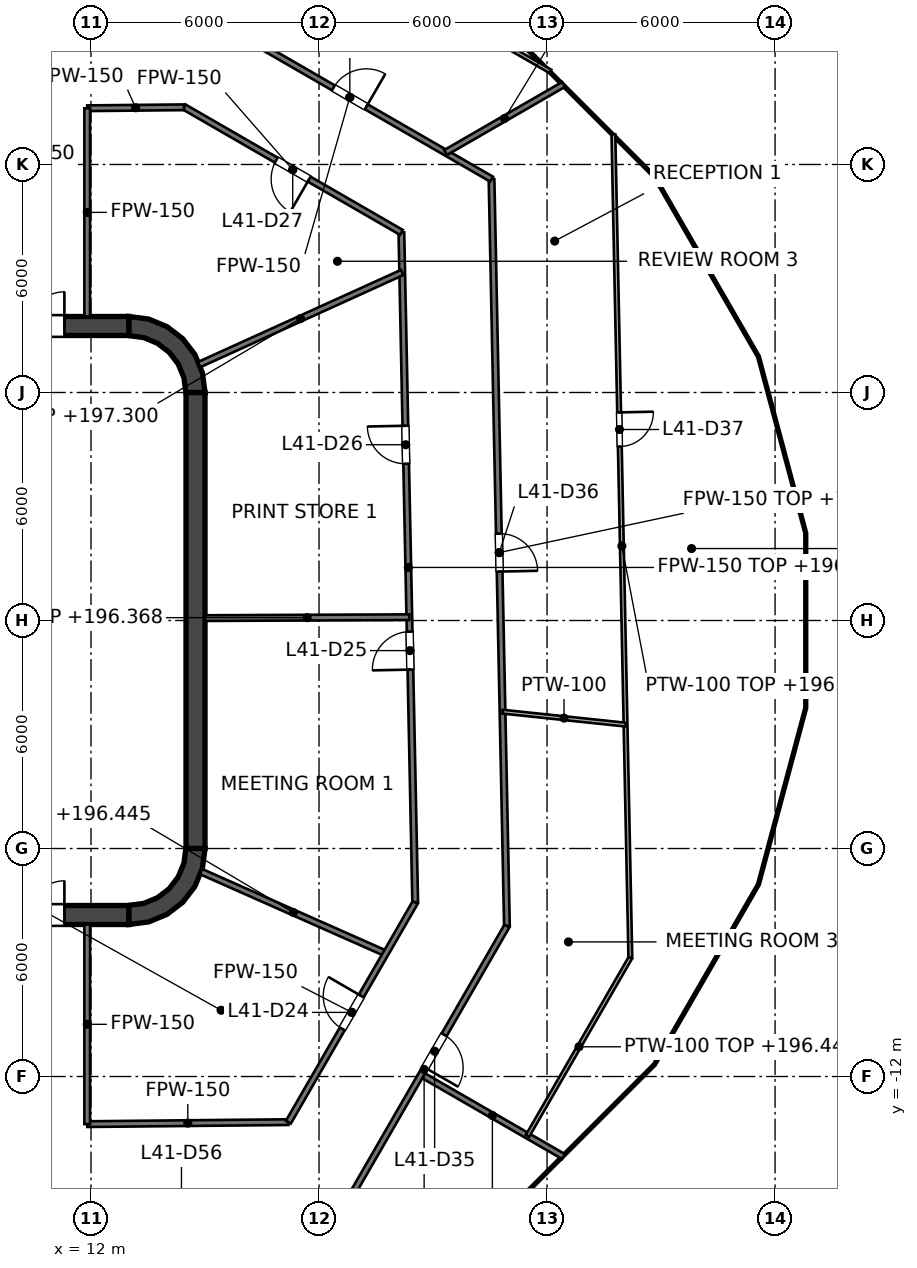
"""IFC4 building model, lengths in metres.
Left out: names, types, materials, properties, quantities, classifications, styles, units other than length and angle.
Written with IfcOpenShell. Run it as: python <this file> out.ifc"""

import sys

from ifc_helpers import new_model, si_unit, direction, frame, frame_2d, origin, place, context, subcontext, project, spatial, polyline, rectangle, outline, extrude, element, fill, save


model = new_model("IFC4")
c1 = context("Model", 3, precision=1e-05, world=origin(), true_north=direction((0.0, 1.0)))
c2 = subcontext(c1, "Body", "Model", "MODEL_VIEW")
j1 = project(units=[si_unit("LENGTHUNIT", "METRE"), si_unit("PLANEANGLEUNIT", "RADIAN")], contexts=[c1])
p1 = place(None, origin())
s1 = spatial("IfcSite", under=j1, at=p1, CompositionType="ELEMENT")
p2 = place(p1, origin())
s2 = spatial("IfcBuilding", under=s1, at=p2, CompositionType="ELEMENT")
p3 = place(p2, frame((0.0, 0.0, 193.6)))
s3 = spatial("IfcBuildingStorey", under=s2, at=p3, CompositionType="ELEMENT", Elevation=193.6)
p4 = place(p3, frame((-13.0, 7.75, 0.0), z_axis=(0.0, 0.0, 1.0), x_axis=(1.0, 0.0, 0.0)))
e1 = element("IfcWall", 1, at=p4, inside=s3, PredefinedType="SHEAR", context=c2, shape_type="SweptSolid", body=[
    extrude(rectangle(XDim=26.0, YDim=0.5, at=frame_2d((13.0, 0.0))), origin(), (0.0, 0.0, 1.0), 4.0),
])
p5 = place(p4, frame((1.7, 0.0, 0.0)))
e2 = element("IfcOpeningElement", 2, at=p5, cuts=e1, PredefinedType="OPENING", context=c2, shape_type="SweptSolid", body=[
    extrude(rectangle(XDim=1.8, YDim=2.1, at=frame_2d((0.9, 1.05))), frame((0.0, 0.25, 0.0), z_axis=(0.0, -1.0, 0.0), x_axis=(1.0, 0.0, 0.0)), (0.0, 0.0, 1.0), 0.5),
])
p6 = place(p4, frame((22.5, 0.0, 0.0)))
e3 = element("IfcOpeningElement", 3, at=p6, cuts=e1, PredefinedType="OPENING", context=c2, shape_type="SweptSolid", body=[
    extrude(rectangle(XDim=1.8, YDim=2.1, at=frame_2d((0.9, 1.05))), frame((0.0, 0.25, 0.0), z_axis=(0.0, -1.0, 0.0), x_axis=(1.0, 0.0, 0.0)), (0.0, 0.0, 1.0), 0.5),
])
p7 = place(p3, frame((-13.0, -7.75, 0.0), z_axis=(0.0, 0.0, 1.0), x_axis=(1.0, 0.0, 0.0)))
e4 = element("IfcWall", 4, at=p7, inside=s3, PredefinedType="SHEAR", context=c2, shape_type="SweptSolid", body=[
    extrude(rectangle(XDim=26.0, YDim=0.5, at=frame_2d((13.0, 0.0))), origin(), (0.0, 0.0, 1.0), 4.0),
])
p8 = place(p7, frame((1.7, 0.0, 0.0)))
e5 = element("IfcOpeningElement", 5, at=p8, cuts=e4, PredefinedType="OPENING", context=c2, shape_type="SweptSolid", body=[
    extrude(rectangle(XDim=1.8, YDim=2.1, at=frame_2d((0.9, 1.05))), frame((0.0, 0.25, 0.0), z_axis=(0.0, -1.0, 0.0), x_axis=(1.0, 0.0, 0.0)), (0.0, 0.0, 1.0), 0.5),
])
p9 = place(p7, frame((22.5, 0.0, 0.0)))
e6 = element("IfcOpeningElement", 6, at=p9, cuts=e4, PredefinedType="OPENING", context=c2, shape_type="SweptSolid", body=[
    extrude(rectangle(XDim=1.8, YDim=2.1, at=frame_2d((0.9, 1.05))), frame((0.0, 0.25, 0.0), z_axis=(0.0, -1.0, 0.0), x_axis=(1.0, 0.0, 0.0)), (0.0, 0.0, 1.0), 0.5),
])
p10 = place(p3, frame((14.75, -6.0, 0.0), z_axis=(0.0, 0.0, 1.0), x_axis=(0.0, 1.0, 0.0)))
e7 = element("IfcWall", 7, at=p10, inside=s3, PredefinedType="SHEAR", context=c2, shape_type="SweptSolid", body=[
    extrude(rectangle(XDim=12.0, YDim=0.5, at=frame_2d((6.0, 0.0))), origin(), (0.0, 0.0, 1.0), 4.0),
])
p11 = place(p3, origin())
e8 = element("IfcWall", 8, at=p11, inside=s3, PredefinedType="SHEAR", context=c2, shape_type="SweptSolid", body=[
    extrude(outline(polyline([(13.0, 8.0), (13.0, 7.496), (13.387, 7.445), (13.748, 7.295), (14.058, 7.058), (14.295, 6.748), (14.445, 6.387), (14.496, 6.0), (15.0, 6.0), (14.932, 6.518), (14.732, 7.0), (14.414, 7.414), (14.0, 7.732), (13.518, 7.932), (13.0, 8.0)])), origin(), (0.0, 0.0, 1.0), 4.0),
])
e9 = element("IfcWall", 9, at=p11, inside=s3, PredefinedType="SHEAR", context=c2, shape_type="SweptSolid", body=[
    extrude(outline(polyline([(15.0, -6.0), (14.496, -6.0), (14.445, -6.387), (14.295, -6.748), (14.058, -7.058), (13.748, -7.295), (13.387, -7.445), (13.0, -7.496), (13.0, -8.0), (13.518, -7.932), (14.0, -7.732), (14.414, -7.414), (14.732, -7.0), (14.932, -6.518), (15.0, -6.0)])), origin(), (0.0, 0.0, 1.0), 4.0),
])
p12 = place(p3, frame((11.8, -7.5, 0.0), z_axis=(0.0, 0.0, 1.0), x_axis=(0.0, 1.0, 0.0)))
e10 = element("IfcWall", 10, at=p12, inside=s3, PredefinedType="SOLIDWALL", context=c2, shape_type="SweptSolid", body=[
    extrude(rectangle(XDim=15.0, YDim=0.4, at=frame_2d((7.5, 0.0))), origin(), (0.0, 0.0, 1.0), 3.7),
])
p13 = place(p12, frame((11.3, 0.0, 0.0)))
e11 = element("IfcOpeningElement", 11, at=p13, cuts=e10, PredefinedType="OPENING", context=c2, shape_type="SweptSolid", body=[
    extrude(rectangle(XDim=1.1, YDim=2.1, at=frame_2d((0.55, 1.05))), frame((0.0, 0.2, 0.0), z_axis=(0.0, -1.0, 0.0), x_axis=(1.0, 0.0, 0.0)), (0.0, 0.0, 1.0), 0.4),
])
p14 = place(p12, frame((8.4, 0.0, 0.0)))
e12 = element("IfcOpeningElement", 12, at=p14, cuts=e10, PredefinedType="OPENING", context=c2, shape_type="SweptSolid", body=[
    extrude(rectangle(XDim=1.1, YDim=2.1, at=frame_2d((0.55, 1.05))), frame((0.0, 0.2, 0.0), z_axis=(0.0, -1.0, 0.0), x_axis=(1.0, 0.0, 0.0)), (0.0, 0.0, 1.0), 0.4),
])
p15 = place(p12, frame((5.5, 0.0, 0.0)))
e13 = element("IfcOpeningElement", 13, at=p15, cuts=e10, PredefinedType="OPENING", context=c2, shape_type="SweptSolid", body=[
    extrude(rectangle(XDim=1.1, YDim=2.1, at=frame_2d((0.55, 1.05))), frame((0.0, 0.2, 0.0), z_axis=(0.0, -1.0, 0.0), x_axis=(1.0, 0.0, 0.0)), (0.0, 0.0, 1.0), 0.4),
])
p16 = place(p12, frame((13.697, 0.0, 0.0)))
e14 = element("IfcOpeningElement", 14, at=p16, cuts=e10, PredefinedType="OPENING", context=c2, shape_type="SweptSolid", body=[
    extrude(rectangle(XDim=0.9, YDim=2.1, at=frame_2d((0.45, 1.05))), frame((0.0, 0.2, 0.0), z_axis=(0.0, -1.0, 0.0), x_axis=(1.0, 0.0, 0.0)), (0.0, 0.0, 1.0), 0.4),
])
p17 = place(p12, frame((0.403, 0.0, 0.0)))
e15 = element("IfcOpeningElement", 15, at=p17, cuts=e10, PredefinedType="OPENING", context=c2, shape_type="SweptSolid", body=[
    extrude(rectangle(XDim=0.9, YDim=2.1, at=frame_2d((0.45, 1.05))), frame((0.0, 0.2, 0.0), z_axis=(0.0, -1.0, 0.0), x_axis=(1.0, 0.0, 0.0)), (0.0, 0.0, 1.0), 0.4),
])
e16 = element("IfcWall", 16, at=p11, inside=s3, PredefinedType="SOLIDWALL", context=c2, shape_type="SweptSolid", body=[
    extrude(outline(polyline([(12.0, -5.675), (12.0, -5.925), (14.25, -5.925), (14.5, -5.925), (14.5, -5.675), (14.5, -3.025), (14.5, -2.775), (14.5, -0.125), (14.5, 0.125), (14.5, 2.775), (14.5, 3.025), (14.5, 5.675), (14.5, 5.925), (14.25, 5.925), (12.0, 5.925), (12.0, 5.675), (14.25, 5.675), (14.25, 3.025), (12.0, 3.025), (12.0, 2.775), (14.25, 2.775), (14.25, 0.125), (12.0, 0.125), (12.0, -0.125), (14.25, -0.125), (14.25, -2.775), (12.0, -2.775), (12.0, -3.025), (14.25, -3.025), (14.25, -5.675), (12.0, -5.675)])), origin(), (0.0, 0.0, 1.0), 3.7),
])
p18 = place(p3, frame((20.167, 10.213, 0.0), z_axis=(0.0, 0.0, 1.0), x_axis=(0.020624730832, -0.999787287616, 0.0)))
e17 = element("IfcWall", 17, at=p18, inside=s3, PredefinedType="PARTITIONING", context=c2, shape_type="SweptSolid", body=[
    extrude(rectangle(XDim=17.637, YDim=0.15, at=frame_2d((8.819, 0.0))), origin(), (0.0, 0.0, 1.0), 2.768),
])
p19 = place(p18, frame((10.508, 0.0, 0.0)))
e18 = element("IfcOpeningElement", 18, at=p19, cuts=e17, PredefinedType="OPENING", context=c2, shape_type="SweptSolid", body=[
    extrude(rectangle(XDim=1.0, YDim=2.1, at=frame_2d((0.5, 1.05))), frame((0.0, 0.075, 0.0), z_axis=(0.0, -1.0, 0.0), x_axis=(1.0, 0.0, 0.0)), (0.0, 0.0, 1.0), 0.15),
])
p20 = place(p18, frame((5.089, 0.0, 0.0)))
e19 = element("IfcOpeningElement", 19, at=p20, cuts=e17, PredefinedType="OPENING", context=c2, shape_type="SweptSolid", body=[
    extrude(rectangle(XDim=1.0, YDim=2.1, at=frame_2d((0.5, 1.05))), frame((0.0, 0.075, 0.0), z_axis=(0.0, -1.0, 0.0), x_axis=(1.0, 0.0, 0.0)), (0.0, 0.0, 1.0), 0.15),
])
p21 = place(p3, frame((22.539, 11.615, 0.0), z_axis=(0.0, 0.0, 1.0), x_axis=(0.020626332176, -0.99978725458, 0.0)))
e20 = element("IfcWall", 20, at=p21, inside=s3, PredefinedType="PARTITIONING", context=c2, shape_type="SweptSolid", body=[
    extrude(rectangle(XDim=19.66, YDim=0.15, at=frame_2d((9.83, 0.0))), origin(), (0.0, 0.0, 1.0), 2.768),
])
p22 = place(p21, frame((9.33, 0.0, 0.0)))
e21 = element("IfcOpeningElement", 21, at=p22, cuts=e20, PredefinedType="OPENING", context=c2, shape_type="SweptSolid", body=[
    extrude(rectangle(XDim=1.0, YDim=2.1, at=frame_2d((0.5, 1.05))), frame((0.0, 0.075, 0.0), z_axis=(0.0, -1.0, 0.0), x_axis=(1.0, 0.0, 0.0)), (0.0, 0.0, 1.0), 0.15),
])
p23 = place(p3, frame((20.69, -11.945, 0.0), z_axis=(0.0, 0.0, 1.0), x_axis=(0.866048255864, -0.499960416948, 0.0)))
e22 = element("IfcWall", 22, at=p23, inside=s3, PredefinedType="PARTITIONING", context=c2, shape_type="SweptSolid", body=[
    extrude(rectangle(XDim=4.322, YDim=0.15, at=frame_2d((2.161, 0.0))), origin(), (0.0, 0.0, 1.0), 2.845),
])
p24 = place(p3, frame((14.448, 13.515, 0.0), z_axis=(0.0, 0.0, 1.0), x_axis=(0.866032288321, -0.499988075443, 0.0)))
e23 = element("IfcWall", 23, at=p24, inside=s3, PredefinedType="PARTITIONING", context=c2, shape_type="SweptSolid", body=[
    extrude(rectangle(XDim=6.604, YDim=0.15, at=frame_2d((3.302, 0.0))), origin(), (0.0, 0.0, 1.0), 2.777),
])
p25 = place(p24, frame((2.802, 0.0, 0.0)))
e24 = element("IfcOpeningElement", 24, at=p25, cuts=e23, PredefinedType="OPENING", context=c2, shape_type="SweptSolid", body=[
    extrude(rectangle(XDim=1.0, YDim=2.1, at=frame_2d((0.5, 1.05))), frame((0.0, 0.075, 0.0), z_axis=(0.0, -1.0, 0.0), x_axis=(1.0, 0.0, 0.0)), (0.0, 0.0, 1.0), 0.15),
])
p26 = place(p3, frame((15.08, 15.921, 0.0), z_axis=(0.0, 0.0, 1.0), x_axis=(0.866020838546, -0.500007907142, 0.0)))
e25 = element("IfcWall", 25, at=p26, inside=s3, PredefinedType="PARTITIONING", context=c2, shape_type="SweptSolid", body=[
    extrude(rectangle(XDim=8.613, YDim=0.15, at=frame_2d((4.306, 0.0))), origin(), (0.0, 0.0, 1.0), 2.777),
])
p27 = place(p26, frame((3.808, 0.0, 0.0)))
e26 = element("IfcOpeningElement", 26, at=p27, cuts=e25, PredefinedType="OPENING", context=c2, shape_type="SweptSolid", body=[
    extrude(rectangle(XDim=1.0, YDim=2.1, at=frame_2d((0.5, 1.05))), frame((0.0, 0.075, 0.0), z_axis=(0.0, -1.0, 0.0), x_axis=(1.0, 0.0, 0.0)), (0.0, 0.0, 1.0), 0.15),
])
p28 = place(p3, frame((14.895, -6.607, 0.0), z_axis=(0.0, 0.0, 1.0), x_axis=(0.914233271379, -0.405188259337, 0.0)))
e27 = element("IfcWall", 27, at=p28, inside=s3, PredefinedType="PARTITIONING", context=c2, shape_type="SweptSolid", body=[
    extrude(rectangle(XDim=5.317, YDim=0.15, at=frame_2d((2.659, 0.0))), origin(), (0.0, 0.0, 1.0), 2.845),
])
p29 = place(p3, frame((15.0, 0.063, 0.0), z_axis=(0.0, 0.0, 1.0), x_axis=(0.999990294223, 0.004405843865, 0.0)))
e28 = element("IfcWall", 28, at=p29, inside=s3, PredefinedType="PARTITIONING", context=c2, shape_type="SweptSolid", body=[
    extrude(rectangle(XDim=5.375, YDim=0.15, at=frame_2d((2.688, 0.0))), origin(), (0.0, 0.0, 1.0), 2.768),
])
p30 = place(p3, frame((11.9, -13.253, 0.0), z_axis=(0.0, 0.0, 1.0), x_axis=(0.999951309192, 0.009868092237, 0.0)))
e29 = element("IfcWall", 29, at=p30, inside=s3, PredefinedType="PARTITIONING", context=c2, shape_type="SweptSolid", body=[
    extrude(rectangle(XDim=5.294, YDim=0.15, at=frame_2d((2.647, 0.0))), origin(), (0.0, 0.0, 1.0), 2.777),
])
p31 = place(p3, frame((11.9, 13.48, 0.0), z_axis=(0.0, 0.0, 1.0), x_axis=(0.999951307579, 0.009868255694, 0.0)))
e30 = element("IfcWall", 30, at=p31, inside=s3, PredefinedType="PARTITIONING", context=c2, shape_type="SweptSolid", body=[
    extrude(rectangle(XDim=2.548, YDim=0.15, at=frame_2d((1.274, 0.0))), origin(), (0.0, 0.0, 1.0), 2.777),
])
p32 = place(p3, frame((14.843, 6.733, 0.0), z_axis=(0.0, 0.0, 1.0), x_axis=(0.910628361306, 0.413226315214, 0.0)))
e31 = element("IfcWall", 31, at=p32, inside=s3, PredefinedType="PARTITIONING", context=c2, shape_type="SweptSolid", body=[
    extrude(rectangle(XDim=5.87, YDim=0.15, at=frame_2d((2.935, 0.0))), origin(), (0.0, 0.0, 1.0), 3.7),
])
p33 = place(p3, frame((21.329, 12.314, 0.0), z_axis=(0.0, 0.0, 1.0), x_axis=(0.866038125567, 0.499977964579, 0.0)))
e32 = element("IfcWall", 32, at=p33, inside=s3, PredefinedType="PARTITIONING", context=c2, shape_type="SweptSolid", body=[
    extrude(rectangle(XDim=3.584, YDim=0.15, at=frame_2d((1.792, 0.0))), origin(), (0.0, 0.0, 1.0), 2.845),
])
p34 = place(p3, frame((18.587, -15.587, 0.0), z_axis=(0.0, 0.0, 1.0), x_axis=(0.499960140076, 0.866048415699, 0.0)))
e33 = element("IfcWall", 33, at=p34, inside=s3, PredefinedType="PARTITIONING", context=c2, shape_type="SweptSolid", body=[
    extrude(rectangle(XDim=8.714, YDim=0.15, at=frame_2d((4.357, 0.0))), origin(), (0.0, 0.0, 1.0), 2.777),
])
p35 = place(p34, frame((4.41, 0.0, 0.0)))
e34 = element("IfcOpeningElement", 34, at=p35, cuts=e33, PredefinedType="OPENING", context=c2, shape_type="SweptSolid", body=[
    extrude(rectangle(XDim=1.0, YDim=2.1, at=frame_2d((0.5, 1.05))), frame((0.0, 0.075, 0.0), z_axis=(0.0, -1.0, 0.0), x_axis=(1.0, 0.0, 0.0)), (0.0, 0.0, 1.0), 0.15),
])
p36 = place(p3, frame((17.194, -13.201, 0.0), z_axis=(0.0, 0.0, 1.0), x_axis=(0.499955744085, 0.866050953441, 0.0)))
e35 = element("IfcWall", 35, at=p36, inside=s3, PredefinedType="PARTITIONING", context=c2, shape_type="SweptSolid", body=[
    extrude(rectangle(XDim=6.673, YDim=0.15, at=frame_2d((3.337, 0.0))), origin(), (0.0, 0.0, 1.0), 2.777),
])
p37 = place(p36, frame((2.835, 0.0, 0.0)))
e36 = element("IfcOpeningElement", 36, at=p37, cuts=e35, PredefinedType="OPENING", context=c2, shape_type="SweptSolid", body=[
    extrude(rectangle(XDim=1.0, YDim=2.1, at=frame_2d((0.5, 1.05))), frame((0.0, 0.075, 0.0), z_axis=(0.0, -1.0, 0.0), x_axis=(1.0, 0.0, 0.0)), (0.0, 0.0, 1.0), 0.15),
])
p38 = place(p3, frame((11.9, -13.253, 0.0), z_axis=(0.0, 0.0, 1.0), x_axis=(0.0, 1.0, 0.0)))
e37 = element("IfcWall", 37, at=p38, inside=s3, PredefinedType="PARTITIONING", context=c2, shape_type="SweptSolid", body=[
    extrude(rectangle(XDim=5.253, YDim=0.15, at=frame_2d((2.626, 0.0))), origin(), (0.0, 0.0, 1.0), 2.777),
])
p39 = place(p3, frame((11.9, 8.0, 0.0), z_axis=(0.0, 0.0, 1.0), x_axis=(0.0, 1.0, 0.0)))
e38 = element("IfcWall", 38, at=p39, inside=s3, PredefinedType="PARTITIONING", context=c2, shape_type="SweptSolid", body=[
    extrude(rectangle(XDim=5.479, YDim=0.15, at=frame_2d((2.74, 0.0))), origin(), (0.0, 0.0, 1.0), 2.777),
])
p40 = place(p3, frame((25.746, 12.794, 0.0), z_axis=(0.0, 0.0, 1.0), x_axis=(0.020556718749, -0.999788688331, 0.0)))
e39 = element("IfcWall", 39, at=p40, inside=s3, PredefinedType="PARTITIONING", context=c2, shape_type="SweptSolid", body=[
    extrude(rectangle(XDim=21.675, YDim=0.1, at=frame_2d((10.837, 0.0))), origin(), (0.0, 0.0, 1.0), 2.768),
])
p41 = place(p40, frame((7.32, 0.0, 0.0)))
e40 = element("IfcOpeningElement", 40, at=p41, cuts=e39, PredefinedType="OPENING", context=c2, shape_type="SweptSolid", body=[
    extrude(rectangle(XDim=0.9, YDim=2.1, at=frame_2d((0.45, 1.05))), frame((0.0, 0.05, 0.0), z_axis=(0.0, -1.0, 0.0), x_axis=(1.0, 0.0, 0.0)), (0.0, 0.0, 1.0), 0.1),
])
p42 = place(p3, frame((15.931, 19.16, 0.0), z_axis=(0.0, 0.0, 1.0), x_axis=(0.86598056092, -0.500077662076, 0.0)))
e41 = element("IfcWall", 41, at=p42, inside=s3, PredefinedType="PARTITIONING", context=c2, shape_type="SweptSolid", body=[
    extrude(rectangle(XDim=9.42, YDim=0.1, at=frame_2d((4.71, 0.0))), origin(), (0.0, 0.0, 1.0), 2.777),
])
p43 = place(p3, frame((22.828, -2.399, 0.0), z_axis=(0.0, 0.0, 1.0), x_axis=(0.994498465997, -0.104751139033, 0.0)))
e42 = element("IfcWall", 42, at=p43, inside=s3, PredefinedType="PARTITIONING", context=c2, shape_type="SweptSolid", body=[
    extrude(rectangle(XDim=3.256, YDim=0.1, at=frame_2d((1.628, 0.0))), origin(), (0.0, 0.0, 1.0), 3.7),
])
p44 = place(p3, frame((23.487, -13.56, 0.0), z_axis=(0.0, 0.0, 1.0), x_axis=(0.500066272392, 0.86598713802, 0.0)))
e43 = element("IfcWall", 43, at=p44, inside=s3, PredefinedType="PARTITIONING", context=c2, shape_type="SweptSolid", body=[
    extrude(rectangle(XDim=5.409, YDim=0.1, at=frame_2d((2.705, 0.0))), origin(), (0.0, 0.0, 1.0), 2.845),
])
p45 = place(p13, origin())
e44 = element("IfcDoor", 44, at=p45, inside=s3, OperationType="DOUBLE_DOOR_SLIDING", PredefinedType="DOOR", context=c2, shape_type="SweptSolid", body=[
    extrude(rectangle(XDim=1.1, YDim=2.1, at=frame_2d((0.55, 1.05))), frame((0.0, 0.025, 0.0), z_axis=(0.0, -1.0, 0.0), x_axis=(1.0, 0.0, 0.0)), (0.0, 0.0, 1.0), 0.05),
])
fill(e11, e44)
p46 = place(p14, origin())
e45 = element("IfcDoor", 45, at=p46, inside=s3, OperationType="DOUBLE_DOOR_SLIDING", PredefinedType="DOOR", context=c2, shape_type="SweptSolid", body=[
    extrude(rectangle(XDim=1.1, YDim=2.1, at=frame_2d((0.55, 1.05))), frame((0.0, 0.025, 0.0), z_axis=(0.0, -1.0, 0.0), x_axis=(1.0, 0.0, 0.0)), (0.0, 0.0, 1.0), 0.05),
])
fill(e12, e45)
p47 = place(p15, origin())
e46 = element("IfcDoor", 46, at=p47, inside=s3, OperationType="DOUBLE_DOOR_SLIDING", PredefinedType="DOOR", context=c2, shape_type="SweptSolid", body=[
    extrude(rectangle(XDim=1.1, YDim=2.1, at=frame_2d((0.55, 1.05))), frame((0.0, 0.025, 0.0), z_axis=(0.0, -1.0, 0.0), x_axis=(1.0, 0.0, 0.0)), (0.0, 0.0, 1.0), 0.05),
])
fill(e13, e46)
p48 = place(p16, origin())
e47 = element("IfcDoor", 47, at=p48, inside=s3, OperationType="SINGLE_SWING_RIGHT", PredefinedType="DOOR", context=c2, shape_type="SweptSolid", body=[
    extrude(rectangle(XDim=0.9, YDim=2.1, at=frame_2d((0.45, 1.05))), frame((0.0, 0.025, 0.0), z_axis=(0.0, -1.0, 0.0), x_axis=(1.0, 0.0, 0.0)), (0.0, 0.0, 1.0), 0.05),
])
fill(e14, e47)
p49 = place(p17, origin())
e48 = element("IfcDoor", 48, at=p49, inside=s3, OperationType="SINGLE_SWING_RIGHT", PredefinedType="DOOR", context=c2, shape_type="SweptSolid", body=[
    extrude(rectangle(XDim=0.9, YDim=2.1, at=frame_2d((0.45, 1.05))), frame((0.0, 0.025, 0.0), z_axis=(0.0, -1.0, 0.0), x_axis=(1.0, 0.0, 0.0)), (0.0, 0.0, 1.0), 0.05),
])
fill(e15, e48)
p50 = place(p6, origin())
e49 = element("IfcDoor", 49, at=p50, inside=s3, OperationType="DOUBLE_DOOR_SINGLE_SWING", PredefinedType="DOOR", context=c2, shape_type="SweptSolid", body=[
    extrude(rectangle(XDim=1.8, YDim=2.1, at=frame_2d((0.9, 1.05))), frame((0.0, 0.025, 0.0), z_axis=(0.0, -1.0, 0.0), x_axis=(1.0, 0.0, 0.0)), (0.0, 0.0, 1.0), 0.05),
])
fill(e3, e49)
p51 = place(p9, origin())
e50 = element("IfcDoor", 50, at=p51, inside=s3, OperationType="DOUBLE_DOOR_SINGLE_SWING", PredefinedType="DOOR", context=c2, shape_type="SweptSolid", body=[
    extrude(rectangle(XDim=1.8, YDim=2.1, at=frame_2d((0.9, 1.05))), frame((0.0, 0.025, 0.0), z_axis=(0.0, -1.0, 0.0), x_axis=(1.0, 0.0, 0.0)), (0.0, 0.0, 1.0), 0.05),
])
fill(e6, e50)
p52 = place(p37, origin())
e51 = element("IfcDoor", 51, at=p52, inside=s3, OperationType="SINGLE_SWING_RIGHT", PredefinedType="DOOR", context=c2, shape_type="SweptSolid", body=[
    extrude(rectangle(XDim=1.0, YDim=2.1, at=frame_2d((0.5, 1.05))), frame((0.0, 0.025, 0.0), z_axis=(0.0, -1.0, 0.0), x_axis=(1.0, 0.0, 0.0)), (0.0, 0.0, 1.0), 0.05),
])
fill(e36, e51)
p53 = place(p19, origin())
e52 = element("IfcDoor", 52, at=p53, inside=s3, OperationType="SINGLE_SWING_RIGHT", PredefinedType="DOOR", context=c2, shape_type="SweptSolid", body=[
    extrude(rectangle(XDim=1.0, YDim=2.1, at=frame_2d((0.5, 1.05))), frame((0.0, 0.025, 0.0), z_axis=(0.0, -1.0, 0.0), x_axis=(1.0, 0.0, 0.0)), (0.0, 0.0, 1.0), 0.05),
])
fill(e18, e52)
p54 = place(p20, origin())
e53 = element("IfcDoor", 53, at=p54, inside=s3, OperationType="SINGLE_SWING_LEFT", PredefinedType="DOOR", context=c2, shape_type="SweptSolid", body=[
    extrude(rectangle(XDim=1.0, YDim=2.1, at=frame_2d((0.5, 1.05))), frame((0.0, 0.025, 0.0), z_axis=(0.0, -1.0, 0.0), x_axis=(1.0, 0.0, 0.0)), (0.0, 0.0, 1.0), 0.05),
])
fill(e19, e53)
p55 = place(p25, origin())
e54 = element("IfcDoor", 54, at=p55, inside=s3, OperationType="SINGLE_SWING_RIGHT", PredefinedType="DOOR", context=c2, shape_type="SweptSolid", body=[
    extrude(rectangle(XDim=1.0, YDim=2.1, at=frame_2d((0.5, 1.05))), frame((0.0, 0.025, 0.0), z_axis=(0.0, -1.0, 0.0), x_axis=(1.0, 0.0, 0.0)), (0.0, 0.0, 1.0), 0.05),
])
fill(e24, e54)
p56 = place(p35, origin())
e55 = element("IfcDoor", 55, at=p56, inside=s3, OperationType="SINGLE_SWING_LEFT", PredefinedType="DOOR", context=c2, shape_type="SweptSolid", body=[
    extrude(rectangle(XDim=1.0, YDim=2.1, at=frame_2d((0.5, 1.05))), frame((0.0, 0.025, 0.0), z_axis=(0.0, -1.0, 0.0), x_axis=(1.0, 0.0, 0.0)), (0.0, 0.0, 1.0), 0.05),
])
fill(e34, e55)
p57 = place(p22, origin())
e56 = element("IfcDoor", 56, at=p57, inside=s3, OperationType="SINGLE_SWING_RIGHT", PredefinedType="DOOR", context=c2, shape_type="SweptSolid", body=[
    extrude(rectangle(XDim=1.0, YDim=2.1, at=frame_2d((0.5, 1.05))), frame((0.0, 0.025, 0.0), z_axis=(0.0, -1.0, 0.0), x_axis=(1.0, 0.0, 0.0)), (0.0, 0.0, 1.0), 0.05),
])
fill(e21, e56)
p58 = place(p41, origin())
e57 = element("IfcDoor", 57, at=p58, inside=s3, OperationType="SINGLE_SWING_LEFT", PredefinedType="DOOR", context=c2, shape_type="SweptSolid", body=[
    extrude(rectangle(XDim=0.9, YDim=2.1, at=frame_2d((0.45, 1.05))), frame((0.0, 0.025, 0.0), z_axis=(0.0, -1.0, 0.0), x_axis=(1.0, 0.0, 0.0)), (0.0, 0.0, 1.0), 0.05),
])
fill(e40, e57)
p59 = place(p27, origin())
e58 = element("IfcDoor", 58, at=p59, inside=s3, OperationType="SINGLE_SWING_RIGHT", PredefinedType="DOOR", context=c2, shape_type="SweptSolid", body=[
    extrude(rectangle(XDim=1.0, YDim=2.1, at=frame_2d((0.5, 1.05))), frame((0.0, 0.025, 0.0), z_axis=(0.0, -1.0, 0.0), x_axis=(1.0, 0.0, 0.0)), (0.0, 0.0, 1.0), 0.05),
])
fill(e26, e58)
save(model, sys.argv[1])
